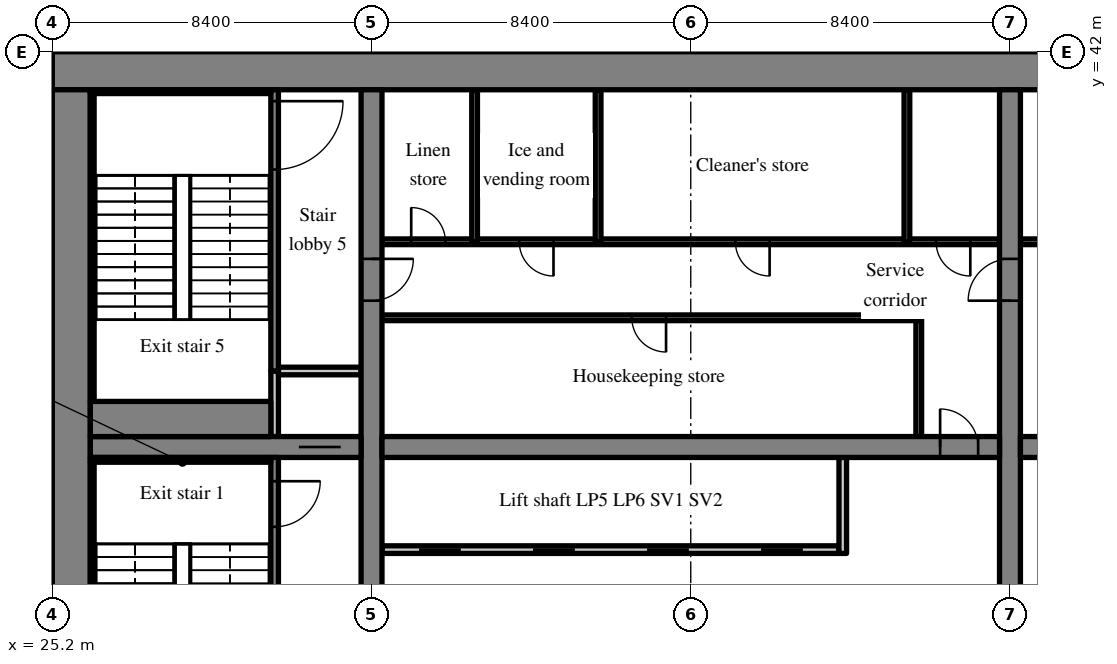
"""IFC4 building model, lengths in metres.
Left out: names, types, materials, properties, quantities, classifications, styles, units other than length and angle.
Written with IfcOpenShell. Run it as: python <this file> out.ifc"""

import sys

from ifc_helpers import new_model, si_unit, direction, frame, frame_2d, origin, place, context, subcontext, project, spatial, rectangle, extrude, source, transform, mapped, element, fill, save


model = new_model("IFC4")
c1 = context("Model", 3, precision=1e-05, world=origin(), true_north=direction((0.0, 1.0)))
c2 = subcontext(c1, "Body", "Model", "MODEL_VIEW")
j1 = project(units=[si_unit("LENGTHUNIT", "METRE"), si_unit("PLANEANGLEUNIT", "RADIAN")], contexts=[c1])
p1 = place(None, origin())
s1 = spatial("IfcSite", under=j1, at=p1, CompositionType="ELEMENT")
p2 = place(p1, origin())
s2 = spatial("IfcBuilding", under=s1, at=p2, CompositionType="ELEMENT")
p3 = place(p2, frame((0.0, 0.0, 46.8)))
s3 = spatial("IfcBuildingStorey", under=s2, at=p3, CompositionType="ELEMENT", Elevation=46.8)
m1 = source(origin(), c2, "Body", "SweptSolid", [
    extrude(rectangle(XDim=50.4, YDim=1.0, at=frame_2d((25.2, 0.0))), origin(), (0.0, 0.0, 1.0), 3.52),
])
p4 = place(p3, frame((25.2, 41.5, 0.0), z_axis=(0.0, 0.0, 1.0), x_axis=(1.0, 0.0, 0.0)))
e1 = element("IfcWall", 1, at=p4, inside=s3, PredefinedType="SHEAR", context=c2, shape_type="MappedRepresentation", body=[
    mapped(m1, transform((0.0, 0.0, 0.0), scale=1.0)),
])
m2 = source(origin(), c2, "Body", "SweptSolid", [
    extrude(rectangle(XDim=18.0, YDim=1.0, at=frame_2d((9.0, 0.0))), origin(), (0.0, 0.0, 1.0), 3.52),
])
p5 = place(p3, frame((25.7, 23.0, 0.0), z_axis=(0.0, 0.0, 1.0), x_axis=(0.0, 1.0, 0.0)))
e2 = element("IfcWall", 2, at=p5, inside=s3, PredefinedType="SHEAR", context=c2, shape_type="MappedRepresentation", body=[
    mapped(m2, transform((0.0, 0.0, 0.0), scale=1.0)),
])
m3 = source(origin(), c2, "Body", "SweptSolid", [
    extrude(rectangle(XDim=18.0, YDim=0.55, at=frame_2d((9.0, 0.0))), origin(), (0.0, 0.0, 1.0), 3.52),
])
p6 = place(p3, frame((33.6, 23.0, 0.0), z_axis=(0.0, 0.0, 1.0), x_axis=(0.0, 1.0, 0.0)))
e3 = element("IfcWall", 3, at=p6, inside=s3, PredefinedType="SHEAR", context=c2, shape_type="MappedRepresentation", body=[
    mapped(m3, transform((0.0, 0.0, 0.0), scale=1.0)),
])
m4 = source(origin(), c2, "Body", "SweptSolid", [
    extrude(rectangle(XDim=1.1, YDim=2.1, at=frame_2d((0.55, 1.05))), frame((0.0, 0.285, 0.0), z_axis=(0.0, -1.0, 0.0), x_axis=(1.0, 0.0, 0.0)), (0.0, 0.0, 1.0), 0.57),
])
p7 = place(p6, frame((12.45, 0.0, 0.0)))
e4 = element("IfcOpeningElement", 4, at=p7, cuts=e3, PredefinedType="OPENING", context=c2, shape_type="MappedRepresentation", body=[
    mapped(m4, transform((0.0, 0.0, 0.0), scale=1.0)),
])
p8 = place(p3, frame((50.4, 23.0, 0.0), z_axis=(0.0, 0.0, 1.0), x_axis=(0.0, 1.0, 0.0)))
e5 = element("IfcWall", 5, at=p8, inside=s3, PredefinedType="SHEAR", context=c2, shape_type="MappedRepresentation", body=[
    mapped(m3, transform((0.0, 0.0, 0.0), scale=1.0)),
])
p9 = place(p8, frame((12.45, 0.0, 0.0)))
e6 = element("IfcOpeningElement", 6, at=p9, cuts=e5, PredefinedType="OPENING", context=c2, shape_type="MappedRepresentation", body=[
    mapped(m4, transform((0.0, 0.0, 0.0), scale=1.0)),
])
m5 = source(origin(), c2, "Body", "SweptSolid", [
    extrude(rectangle(XDim=7.125, YDim=0.55, at=frame_2d((3.562, 0.0))), origin(), (0.0, 0.0, 1.0), 3.52),
])
p10 = place(p3, frame((26.2, 31.6, 0.0), z_axis=(0.0, 0.0, 1.0), x_axis=(1.0, 0.0, 0.0)))
e7 = element("IfcWall", 7, at=p10, inside=s3, PredefinedType="SHEAR", context=c2, shape_type="MappedRepresentation", body=[
    mapped(m5, transform((0.0, 0.0, 0.0), scale=1.0)),
])
p11 = place(p10, frame((5.488, 0.0, 0.0)))
e8 = element("IfcOpeningElement", 8, at=p11, cuts=e7, PredefinedType="OPENING", context=c2, shape_type="MappedRepresentation", body=[
    mapped(m4, transform((0.0, 0.0, 0.0), scale=1.0)),
])
m6 = source(origin(), c2, "Body", "SweptSolid", [
    extrude(rectangle(XDim=16.25, YDim=0.55, at=frame_2d((8.125, 0.0))), origin(), (0.0, 0.0, 1.0), 3.52),
])
p12 = place(p3, frame((33.875, 31.6, 0.0), z_axis=(0.0, 0.0, 1.0), x_axis=(1.0, 0.0, 0.0)))
e9 = element("IfcWall", 9, at=p12, inside=s3, PredefinedType="SHEAR", context=c2, shape_type="MappedRepresentation", body=[
    mapped(m6, transform((0.0, 0.0, 0.0), scale=1.0)),
])
m7 = source(origin(), c2, "Body", "SweptSolid", [
    extrude(rectangle(XDim=1.0, YDim=2.1, at=frame_2d((0.5, 1.05))), frame((0.0, 0.285, 0.0), z_axis=(0.0, -1.0, 0.0), x_axis=(1.0, 0.0, 0.0)), (0.0, 0.0, 1.0), 0.57),
])
p13 = place(p12, frame((14.687, 0.0, 0.0)))
e10 = element("IfcOpeningElement", 10, at=p13, cuts=e9, PredefinedType="OPENING", context=c2, shape_type="MappedRepresentation", body=[
    mapped(m7, transform((0.0, 0.0, 0.0), scale=1.0)),
])
p14 = place(p3, frame((50.675, 31.6, 0.0), z_axis=(0.0, 0.0, 1.0), x_axis=(1.0, 0.0, 0.0)))
e11 = element("IfcWall", 11, at=p14, inside=s3, PredefinedType="SHEAR", context=c2, shape_type="MappedRepresentation", body=[
    mapped(m6, transform((0.0, 0.0, 0.0), scale=1.0)),
])
p15 = place(p14, frame((0.562, 0.0, 0.0)))
e12 = element("IfcOpeningElement", 12, at=p15, cuts=e11, PredefinedType="OPENING", context=c2, shape_type="MappedRepresentation", body=[
    mapped(m7, transform((0.0, 0.0, 0.0), scale=1.0)),
])
m8 = source(origin(), c2, "Body", "SweptSolid", [
    extrude(rectangle(XDim=3.559, YDim=0.3, at=frame_2d((1.78, 0.0))), origin(), (0.0, 0.0, 1.0), 3.52),
])
p16 = place(p3, frame((25.55, 39.969, 0.0), z_axis=(0.0, 0.0, 1.0), x_axis=(-0.35779745313, 0.933799219604, 0.0)))
e13 = element("IfcWall", 13, at=p16, inside=s3, PredefinedType="SOLIDWALL", context=c2, shape_type="MappedRepresentation", body=[
    mapped(m8, transform((0.0, 0.0, 0.0), scale=1.0)),
])
m9 = source(origin(), c2, "Body", "SweptSolid", [
    extrude(rectangle(XDim=1.5, YDim=2.0, at=frame_2d((0.75, 1.0))), frame((0.0, 0.16, 0.0), z_axis=(0.0, -1.0, 0.0), x_axis=(1.0, 0.0, 0.0)), (0.0, 0.0, 1.0), 0.32),
])
p17 = place(p16, frame((1.903, 0.0, 0.9)))
e14 = element("IfcOpeningElement", 14, at=p17, cuts=e13, PredefinedType="OPENING", context=c2, shape_type="MappedRepresentation", body=[
    mapped(m9, transform((0.0, 0.0, 0.0), scale=1.0)),
])
m10 = source(origin(), c2, "Body", "SweptSolid", [
    extrude(rectangle(XDim=12.025, YDim=0.2, at=frame_2d((6.012, 0.0))), origin(), (0.0, 0.0, 1.0), 3.52),
])
p18 = place(p3, frame((33.875, 28.9, 0.0), z_axis=(0.0, 0.0, 1.0), x_axis=(1.0, 0.0, 0.0)))
e15 = element("IfcWall", 15, at=p18, inside=s3, PredefinedType="SOLIDWALL", context=c2, shape_type="MappedRepresentation", body=[
    mapped(m10, transform((0.0, 0.0, 0.0), scale=1.0)),
])
m11 = source(origin(), c2, "Body", "SweptSolid", [
    extrude(rectangle(XDim=1.1, YDim=2.1, at=frame_2d((0.55, 1.05))), frame((0.0, 0.11, 0.0), z_axis=(0.0, -1.0, 0.0), x_axis=(1.0, 0.0, 0.0)), (0.0, 0.0, 1.0), 0.22),
])
p19 = place(p18, frame((0.975, 0.0, 0.0)))
e16 = element("IfcOpeningElement", 16, at=p19, cuts=e15, PredefinedType="OPENING", context=c2, shape_type="MappedRepresentation", body=[
    mapped(m11, transform((0.0, 0.0, 0.0), scale=1.0)),
])
p20 = place(p18, frame((3.975, 0.0, 0.0)))
e17 = element("IfcOpeningElement", 17, at=p20, cuts=e15, PredefinedType="OPENING", context=c2, shape_type="MappedRepresentation", body=[
    mapped(m11, transform((0.0, 0.0, 0.0), scale=1.0)),
])
p21 = place(p18, frame((6.975, 0.0, 0.0)))
e18 = element("IfcOpeningElement", 18, at=p21, cuts=e15, PredefinedType="OPENING", context=c2, shape_type="MappedRepresentation", body=[
    mapped(m11, transform((0.0, 0.0, 0.0), scale=1.0)),
])
p22 = place(p18, frame((9.975, 0.0, 0.0)))
e19 = element("IfcOpeningElement", 19, at=p22, cuts=e15, PredefinedType="OPENING", context=c2, shape_type="MappedRepresentation", body=[
    mapped(m11, transform((0.0, 0.0, 0.0), scale=1.0)),
])
m12 = source(origin(), c2, "Body", "SweptSolid", [
    extrude(rectangle(XDim=2.525, YDim=0.2, at=frame_2d((1.262, 0.0))), origin(), (0.0, 0.0, 1.0), 3.52),
])
p23 = place(p3, frame((46.0, 28.8, 0.0), z_axis=(0.0, 0.0, 1.0), x_axis=(0.0, 1.0, 0.0)))
e20 = element("IfcWall", 20, at=p23, inside=s3, PredefinedType="SOLIDWALL", context=c2, shape_type="MappedRepresentation", body=[
    mapped(m12, transform((0.0, 0.0, 0.0), scale=1.0)),
])
m13 = source(origin(), c2, "Body", "SweptSolid", [
    extrude(rectangle(XDim=3.125, YDim=0.15, at=frame_2d((1.562, 0.0))), origin(), (0.0, 0.0, 1.0), 3.52),
])
p24 = place(p3, frame((48.0, 31.875, 0.0), z_axis=(0.0, 0.0, 1.0), x_axis=(0.0, 1.0, 0.0)))
e21 = element("IfcWall", 21, at=p24, inside=s3, PredefinedType="PARTITIONING", context=c2, shape_type="MappedRepresentation", body=[
    mapped(m13, transform((0.0, 0.0, 0.0), scale=1.0)),
])
m14 = source(origin(), c2, "Body", "SweptSolid", [
    extrude(rectangle(XDim=14.125, YDim=0.15, at=frame_2d((7.062, 0.0))), origin(), (0.0, 0.0, 1.0), 3.52),
])
p25 = place(p3, frame((33.875, 35.0, 0.0), z_axis=(0.0, 0.0, 1.0), x_axis=(1.0, 0.0, 0.0)))
e22 = element("IfcWall", 22, at=p25, inside=s3, PredefinedType="PARTITIONING", context=c2, shape_type="MappedRepresentation", body=[
    mapped(m14, transform((0.0, 0.0, 0.0), scale=1.0)),
])
m15 = source(origin(), c2, "Body", "SweptSolid", [
    extrude(rectangle(XDim=0.9, YDim=2.1, at=frame_2d((0.45, 1.05))), frame((0.0, 0.085, 0.0), z_axis=(0.0, -1.0, 0.0), x_axis=(1.0, 0.0, 0.0)), (0.0, 0.0, 1.0), 0.17),
])
p26 = place(p25, frame((6.575, 0.0, 0.0)))
e23 = element("IfcOpeningElement", 23, at=p26, cuts=e22, PredefinedType="OPENING", context=c2, shape_type="MappedRepresentation", body=[
    mapped(m15, transform((0.0, 0.0, 0.0), scale=1.0)),
])
m16 = source(origin(), c2, "Body", "SweptSolid", [
    extrude(rectangle(XDim=16.25, YDim=0.15, at=frame_2d((8.125, 0.0))), origin(), (0.0, 0.0, 1.0), 3.52),
])
p27 = place(p3, frame((33.875, 37.0, 0.0), z_axis=(0.0, 0.0, 1.0), x_axis=(1.0, 0.0, 0.0)))
e24 = element("IfcWall", 24, at=p27, inside=s3, PredefinedType="PARTITIONING", context=c2, shape_type="MappedRepresentation", body=[
    mapped(m16, transform((0.0, 0.0, 0.0), scale=1.0)),
])
p28 = place(p27, frame((0.769, 0.0, 0.0)))
e25 = element("IfcOpeningElement", 25, at=p28, cuts=e24, PredefinedType="OPENING", context=c2, shape_type="MappedRepresentation", body=[
    mapped(m15, transform((0.0, 0.0, 0.0), scale=1.0)),
])
p29 = place(p27, frame((3.613, 0.0, 0.0)))
e26 = element("IfcOpeningElement", 26, at=p29, cuts=e24, PredefinedType="OPENING", context=c2, shape_type="MappedRepresentation", body=[
    mapped(m15, transform((0.0, 0.0, 0.0), scale=1.0)),
])
p30 = place(p27, frame((9.3, 0.0, 0.0)))
e27 = element("IfcOpeningElement", 27, at=p30, cuts=e24, PredefinedType="OPENING", context=c2, shape_type="MappedRepresentation", body=[
    mapped(m15, transform((0.0, 0.0, 0.0), scale=1.0)),
])
p31 = place(p27, frame((14.581, 0.0, 0.0)))
e28 = element("IfcOpeningElement", 28, at=p31, cuts=e24, PredefinedType="OPENING", context=c2, shape_type="MappedRepresentation", body=[
    mapped(m15, transform((0.0, 0.0, 0.0), scale=1.0)),
])
m17 = source(origin(), c2, "Body", "SweptSolid", [
    extrude(rectangle(XDim=4.0, YDim=0.15, at=frame_2d((2.0, 0.0))), origin(), (0.0, 0.0, 1.0), 3.52),
])
for number, where, z_axis, x_axis in (
    (29, (36.312, 37.0, 0.0), (0.0, 0.0, 1.0), (0.0, 1.0, 0.0)),
    (30, (39.562, 37.0, 0.0), (0.0, 0.0, 1.0), (0.0, 1.0, 0.0)),
    (31, (47.688, 37.0, 0.0), (0.0, 0.0, 1.0), (0.0, 1.0, 0.0)),
):
    element("IfcWall", number, at=place(p3, frame(where, z_axis=z_axis, x_axis=x_axis)), inside=s3, PredefinedType="PARTITIONING", context=c2, shape_type="MappedRepresentation", body=[
        mapped(m17, transform((0.0, 0.0, 0.0), scale=1.0)),
    ])
p32 = place(p3, frame((66.925, 37.0, 0.0), z_axis=(0.0, 0.0, 1.0), x_axis=(-1.0, 0.0, 0.0)))
e32 = element("IfcWall", 32, at=p32, inside=s3, PredefinedType="PARTITIONING", context=c2, shape_type="MappedRepresentation", body=[
    mapped(m16, transform((0.0, 0.0, 0.0), scale=1.0)),
])
p33 = place(p32, frame((6.456, 0.0, 0.0)))
e33 = element("IfcOpeningElement", 33, at=p33, cuts=e32, PredefinedType="OPENING", context=c2, shape_type="MappedRepresentation", body=[
    mapped(m15, transform((0.0, 0.0, 0.0), scale=1.0)),
])
p34 = place(p32, frame((14.581, 0.0, 0.0)))
e34 = element("IfcOpeningElement", 34, at=p34, cuts=e32, PredefinedType="OPENING", context=c2, shape_type="MappedRepresentation", body=[
    mapped(m15, transform((0.0, 0.0, 0.0), scale=1.0)),
])
m18 = source(origin(), c2, "Body", "SweptSolid", [
    extrude(rectangle(XDim=8.325, YDim=0.2, at=frame_2d((4.163, 0.0))), origin(), (0.0, 0.0, 1.0), 3.52),
])
p35 = place(p3, frame((31.05, 23.0, 0.0), z_axis=(0.0, 0.0, 1.0), x_axis=(0.0, 1.0, 0.0)))
e35 = element("IfcWall", 35, at=p35, inside=s3, PredefinedType="SOLIDWALL", context=c2, shape_type="MappedRepresentation", body=[
    mapped(m18, transform((0.0, 0.0, 0.0), scale=1.0)),
])
m19 = source(origin(), c2, "Body", "SweptSolid", [
    extrude(rectangle(XDim=1.2, YDim=2.1, at=frame_2d((0.6, 1.05))), frame((0.0, 0.11, 0.0), z_axis=(0.0, -1.0, 0.0), x_axis=(1.0, 0.0, 0.0)), (0.0, 0.0, 1.0), 0.22),
])
p36 = place(p35, frame((6.5, 0.0, 0.0)))
e36 = element("IfcOpeningElement", 36, at=p36, cuts=e35, PredefinedType="OPENING", context=c2, shape_type="MappedRepresentation", body=[
    mapped(m19, transform((0.0, 0.0, 0.0), scale=1.0)),
])
m20 = source(origin(), c2, "Body", "SweptSolid", [
    extrude(rectangle(XDim=1.725, YDim=0.2, at=frame_2d((0.863, 0.0))), origin(), (0.0, 0.0, 1.0), 3.52),
])
p37 = place(p3, frame((31.05, 31.875, 0.0), z_axis=(0.0, 0.0, 1.0), x_axis=(0.0, 1.0, 0.0)))
e37 = element("IfcWall", 37, at=p37, inside=s3, PredefinedType="SOLIDWALL", context=c2, shape_type="MappedRepresentation", body=[
    mapped(m20, transform((0.0, 0.0, 0.0), scale=1.0)),
])
m21 = source(origin(), c2, "Body", "SweptSolid", [
    extrude(rectangle(XDim=2.175, YDim=0.2, at=frame_2d((1.087, 0.0))), origin(), (0.0, 0.0, 1.0), 3.52),
])
p38 = place(p3, frame((31.15, 33.6, 0.0), z_axis=(0.0, 0.0, 1.0), x_axis=(1.0, 0.0, 0.0)))
e38 = element("IfcWall", 38, at=p38, inside=s3, PredefinedType="SOLIDWALL", context=c2, shape_type="MappedRepresentation", body=[
    mapped(m21, transform((0.0, 0.0, 0.0), scale=1.0)),
])
m22 = source(origin(), c2, "Body", "SweptSolid", [
    extrude(rectangle(XDim=7.4, YDim=0.2, at=frame_2d((3.7, 0.0))), origin(), (0.0, 0.0, 1.0), 3.52),
])
p39 = place(p3, frame((31.05, 33.6, 0.0), z_axis=(0.0, 0.0, 1.0), x_axis=(0.0, 1.0, 0.0)))
e39 = element("IfcWall", 39, at=p39, inside=s3, PredefinedType="SOLIDWALL", context=c2, shape_type="MappedRepresentation", body=[
    mapped(m22, transform((0.0, 0.0, 0.0), scale=1.0)),
])
m23 = source(origin(), c2, "Body", "SweptSolid", [
    extrude(rectangle(XDim=1.8, YDim=2.1, at=frame_2d((0.9, 1.05))), frame((0.0, 0.11, 0.0), z_axis=(0.0, -1.0, 0.0), x_axis=(1.0, 0.0, 0.0)), (0.0, 0.0, 1.0), 0.22),
])
p40 = place(p39, frame((5.3, 0.0, 0.0)))
e40 = element("IfcOpeningElement", 40, at=p40, cuts=e39, PredefinedType="OPENING", context=c2, shape_type="MappedRepresentation", body=[
    mapped(m23, transform((0.0, 0.0, 0.0), scale=1.0)),
])
m24 = source(origin(), c2, "Body", "SweptSolid", [
    extrude(rectangle(XDim=8.2, YDim=0.2, at=frame_2d((4.1, 0.0))), origin(), (0.0, 0.0, 1.0), 3.52),
])
p41 = place(p3, frame((17.0, 30.4, 0.0), z_axis=(0.0, 0.0, 1.0), x_axis=(1.0, 0.0, 0.0)))
e41 = element("IfcWall", 41, at=p41, inside=s3, PredefinedType="SOLIDWALL", context=c2, shape_type="MappedRepresentation", body=[
    mapped(m24, transform((0.0, 0.0, 0.0), scale=1.0)),
])
m25 = source(origin(), c2, "Body", "SweptSolid", [
    extrude(rectangle(XDim=1.0, YDim=2.1, at=frame_2d((0.5, 1.05))), frame((0.0, 0.11, 0.0), z_axis=(0.0, -1.0, 0.0), x_axis=(1.0, 0.0, 0.0)), (0.0, 0.0, 1.0), 0.22),
])
p42 = place(p41, frame((6.1, 0.0, 0.0)))
e42 = element("IfcOpeningElement", 42, at=p42, cuts=e41, PredefinedType="OPENING", context=c2, shape_type="MappedRepresentation", body=[
    mapped(m25, transform((0.0, 0.0, 0.0), scale=1.0)),
])
m26 = source(origin(), c2, "Body", "SweptSolid", [
    extrude(rectangle(XDim=4.75, YDim=0.125, at=frame_2d((2.375, 0.0))), origin(), (0.0, 0.0, 1.0), 3.52),
])
p43 = place(p3, frame((26.2, 31.262, 0.0), z_axis=(0.0, 0.0, 1.0), x_axis=(1.0, 0.0, 0.0)))
e43 = element("IfcWall", 43, at=p43, inside=s3, PredefinedType="SOLIDWALL", context=c2, shape_type="MappedRepresentation", body=[
    mapped(m26, transform((0.0, 0.0, 0.0), scale=1.0)),
])
m27 = source(origin(), c2, "Body", "SweptSolid", [
    extrude(rectangle(XDim=8.1, YDim=0.1, at=frame_2d((4.05, 0.0))), origin(), (0.0, 0.0, 1.0), 3.52),
])
p44 = place(p3, frame((26.25, 23.1, 0.0), z_axis=(0.0, 0.0, 1.0), x_axis=(0.0, 1.0, 0.0)))
e44 = element("IfcWall", 44, at=p44, inside=s3, PredefinedType="SOLIDWALL", context=c2, shape_type="MappedRepresentation", body=[
    mapped(m27, transform((0.0, 0.0, 0.0), scale=1.0)),
])
m28 = source(origin(), c2, "Body", "SweptSolid", [
    extrude(rectangle(XDim=4.75, YDim=0.1, at=frame_2d((2.375, 0.0))), origin(), (0.0, 0.0, 1.0), 3.52),
])
p45 = place(p3, frame((26.2, 40.95, 0.0), z_axis=(0.0, 0.0, 1.0), x_axis=(1.0, 0.0, 0.0)))
e45 = element("IfcWall", 45, at=p45, inside=s3, PredefinedType="SOLIDWALL", context=c2, shape_type="MappedRepresentation", body=[
    mapped(m28, transform((0.0, 0.0, 0.0), scale=1.0)),
])
m29 = source(origin(), c2, "Body", "SweptSolid", [
    extrude(rectangle(XDim=4.75, YDim=0.925, at=frame_2d((2.375, 0.0))), origin(), (0.0, 0.0, 1.0), 3.52),
])
p46 = place(p3, frame((26.2, 32.337, 0.0), z_axis=(0.0, 0.0, 1.0), x_axis=(1.0, 0.0, 0.0)))
e46 = element("IfcWall", 46, at=p46, inside=s3, PredefinedType="SOLIDWALL", context=c2, shape_type="MappedRepresentation", body=[
    mapped(m29, transform((0.0, 0.0, 0.0), scale=1.0)),
])
p47 = place(p3, frame((26.25, 32.8, 0.0), z_axis=(0.0, 0.0, 1.0), x_axis=(0.0, 1.0, 0.0)))
e47 = element("IfcWall", 47, at=p47, inside=s3, PredefinedType="SOLIDWALL", context=c2, shape_type="MappedRepresentation", body=[
    mapped(m27, transform((0.0, 0.0, 0.0), scale=1.0)),
])
m30 = source(origin(), c2, "Body", "SweptSolid", [
    extrude(rectangle(XDim=1.0, YDim=2.1, at=frame_2d((0.5, 1.05))), frame((0.0, 0.025, 0.0), z_axis=(0.0, -1.0, 0.0), x_axis=(1.0, 0.0, 0.0)), (0.0, 0.0, 1.0), 0.05),
])
p48 = place(p13, origin())
e48 = element("IfcDoor", 48, at=p48, inside=s3, OperationType="SINGLE_SWING_LEFT", PredefinedType="DOOR", context=c2, shape_type="MappedRepresentation", body=[
    mapped(m30, transform((0.0, 0.0, 0.0), scale=1.0)),
])
fill(e10, e48)
m31 = source(origin(), c2, "Body", "SweptSolid", [
    extrude(rectangle(XDim=1.1, YDim=2.1, at=frame_2d((0.55, 1.05))), frame((0.0, 0.025, 0.0), z_axis=(0.0, -1.0, 0.0), x_axis=(1.0, 0.0, 0.0)), (0.0, 0.0, 1.0), 0.05),
])
p49 = place(p19, origin())
e49 = element("IfcDoor", 49, at=p49, inside=s3, OperationType="SLIDING_TO_LEFT", PredefinedType="DOOR", context=c2, shape_type="MappedRepresentation", body=[
    mapped(m31, transform((0.0, 0.0, 0.0), scale=1.0)),
])
fill(e16, e49)
p50 = place(p20, origin())
e50 = element("IfcDoor", 50, at=p50, inside=s3, OperationType="SLIDING_TO_RIGHT", PredefinedType="DOOR", context=c2, shape_type="MappedRepresentation", body=[
    mapped(m31, transform((0.0, 0.0, 0.0), scale=1.0)),
])
fill(e17, e50)
p51 = place(p21, origin())
e51 = element("IfcDoor", 51, at=p51, inside=s3, OperationType="SLIDING_TO_LEFT", PredefinedType="DOOR", context=c2, shape_type="MappedRepresentation", body=[
    mapped(m31, transform((0.0, 0.0, 0.0), scale=1.0)),
])
fill(e18, e51)
p52 = place(p22, origin())
e52 = element("IfcDoor", 52, at=p52, inside=s3, OperationType="SLIDING_TO_RIGHT", PredefinedType="DOOR", context=c2, shape_type="MappedRepresentation", body=[
    mapped(m31, transform((0.0, 0.0, 0.0), scale=1.0)),
])
fill(e19, e52)
m32 = source(origin(), c2, "Body", "SweptSolid", [
    extrude(rectangle(XDim=0.9, YDim=2.1, at=frame_2d((0.45, 1.05))), frame((0.0, 0.025, 0.0), z_axis=(0.0, -1.0, 0.0), x_axis=(1.0, 0.0, 0.0)), (0.0, 0.0, 1.0), 0.05),
])
p53 = place(p26, origin())
e53 = element("IfcDoor", 53, at=p53, inside=s3, OperationType="SINGLE_SWING_RIGHT", PredefinedType="DOOR", context=c2, shape_type="MappedRepresentation", body=[
    mapped(m32, transform((0.0, 0.0, 0.0), scale=1.0)),
])
fill(e23, e53)
p54 = place(p28, origin())
e54 = element("IfcDoor", 54, at=p54, inside=s3, OperationType="SINGLE_SWING_LEFT", PredefinedType="DOOR", context=c2, shape_type="MappedRepresentation", body=[
    mapped(m32, transform((0.0, 0.0, 0.0), scale=1.0)),
])
fill(e25, e54)
p55 = place(p29, origin())
e55 = element("IfcDoor", 55, at=p55, inside=s3, OperationType="SINGLE_SWING_RIGHT", PredefinedType="DOOR", context=c2, shape_type="MappedRepresentation", body=[
    mapped(m32, transform((0.0, 0.0, 0.0), scale=1.0)),
])
fill(e26, e55)
p56 = place(p30, origin())
e56 = element("IfcDoor", 56, at=p56, inside=s3, OperationType="SINGLE_SWING_RIGHT", PredefinedType="DOOR", context=c2, shape_type="MappedRepresentation", body=[
    mapped(m32, transform((0.0, 0.0, 0.0), scale=1.0)),
])
fill(e27, e56)
p57 = place(p31, origin())
e57 = element("IfcDoor", 57, at=p57, inside=s3, OperationType="SINGLE_SWING_RIGHT", PredefinedType="DOOR", context=c2, shape_type="MappedRepresentation", body=[
    mapped(m32, transform((0.0, 0.0, 0.0), scale=1.0)),
])
fill(e28, e57)
m33 = source(origin(), c2, "Body", "SweptSolid", [
    extrude(rectangle(XDim=1.2, YDim=2.1, at=frame_2d((0.6, 1.05))), frame((0.0, 0.025, 0.0), z_axis=(0.0, -1.0, 0.0), x_axis=(1.0, 0.0, 0.0)), (0.0, 0.0, 1.0), 0.05),
])
p58 = place(p36, origin())
e58 = element("IfcDoor", 58, at=p58, inside=s3, OperationType="SINGLE_SWING_RIGHT", PredefinedType="DOOR", context=c2, shape_type="MappedRepresentation", body=[
    mapped(m33, transform((0.0, 0.0, 0.0), scale=1.0)),
])
fill(e36, e58)
p59 = place(p11, origin())
e59 = element("IfcDoor", 59, at=p59, inside=s3, OperationType="SLIDING_TO_LEFT", PredefinedType="DOOR", context=c2, shape_type="MappedRepresentation", body=[
    mapped(m31, transform((0.0, 0.0, 0.0), scale=1.0)),
])
fill(e8, e59)
m34 = source(origin(), c2, "Body", "SweptSolid", [
    extrude(rectangle(XDim=1.8, YDim=2.1, at=frame_2d((0.9, 1.05))), frame((0.0, 0.025, 0.0), z_axis=(0.0, -1.0, 0.0), x_axis=(1.0, 0.0, 0.0)), (0.0, 0.0, 1.0), 0.05),
])
p60 = place(p40, origin())
e60 = element("IfcDoor", 60, at=p60, inside=s3, OperationType="SINGLE_SWING_RIGHT", PredefinedType="DOOR", context=c2, shape_type="MappedRepresentation", body=[
    mapped(m34, transform((0.0, 0.0, 0.0), scale=1.0)),
])
fill(e40, e60)
p61 = place(p7, origin())
e61 = element("IfcDoor", 61, at=p61, inside=s3, OperationType="SINGLE_SWING_RIGHT", PredefinedType="DOOR", context=c2, shape_type="MappedRepresentation", body=[
    mapped(m31, transform((0.0, 0.0, 0.0), scale=1.0)),
])
fill(e4, e61)
p62 = place(p9, origin())
e62 = element("IfcDoor", 62, at=p62, inside=s3, OperationType="SINGLE_SWING_LEFT", PredefinedType="DOOR", context=c2, shape_type="MappedRepresentation", body=[
    mapped(m31, transform((0.0, 0.0, 0.0), scale=1.0)),
])
fill(e6, e62)
save(model, sys.argv[1])
